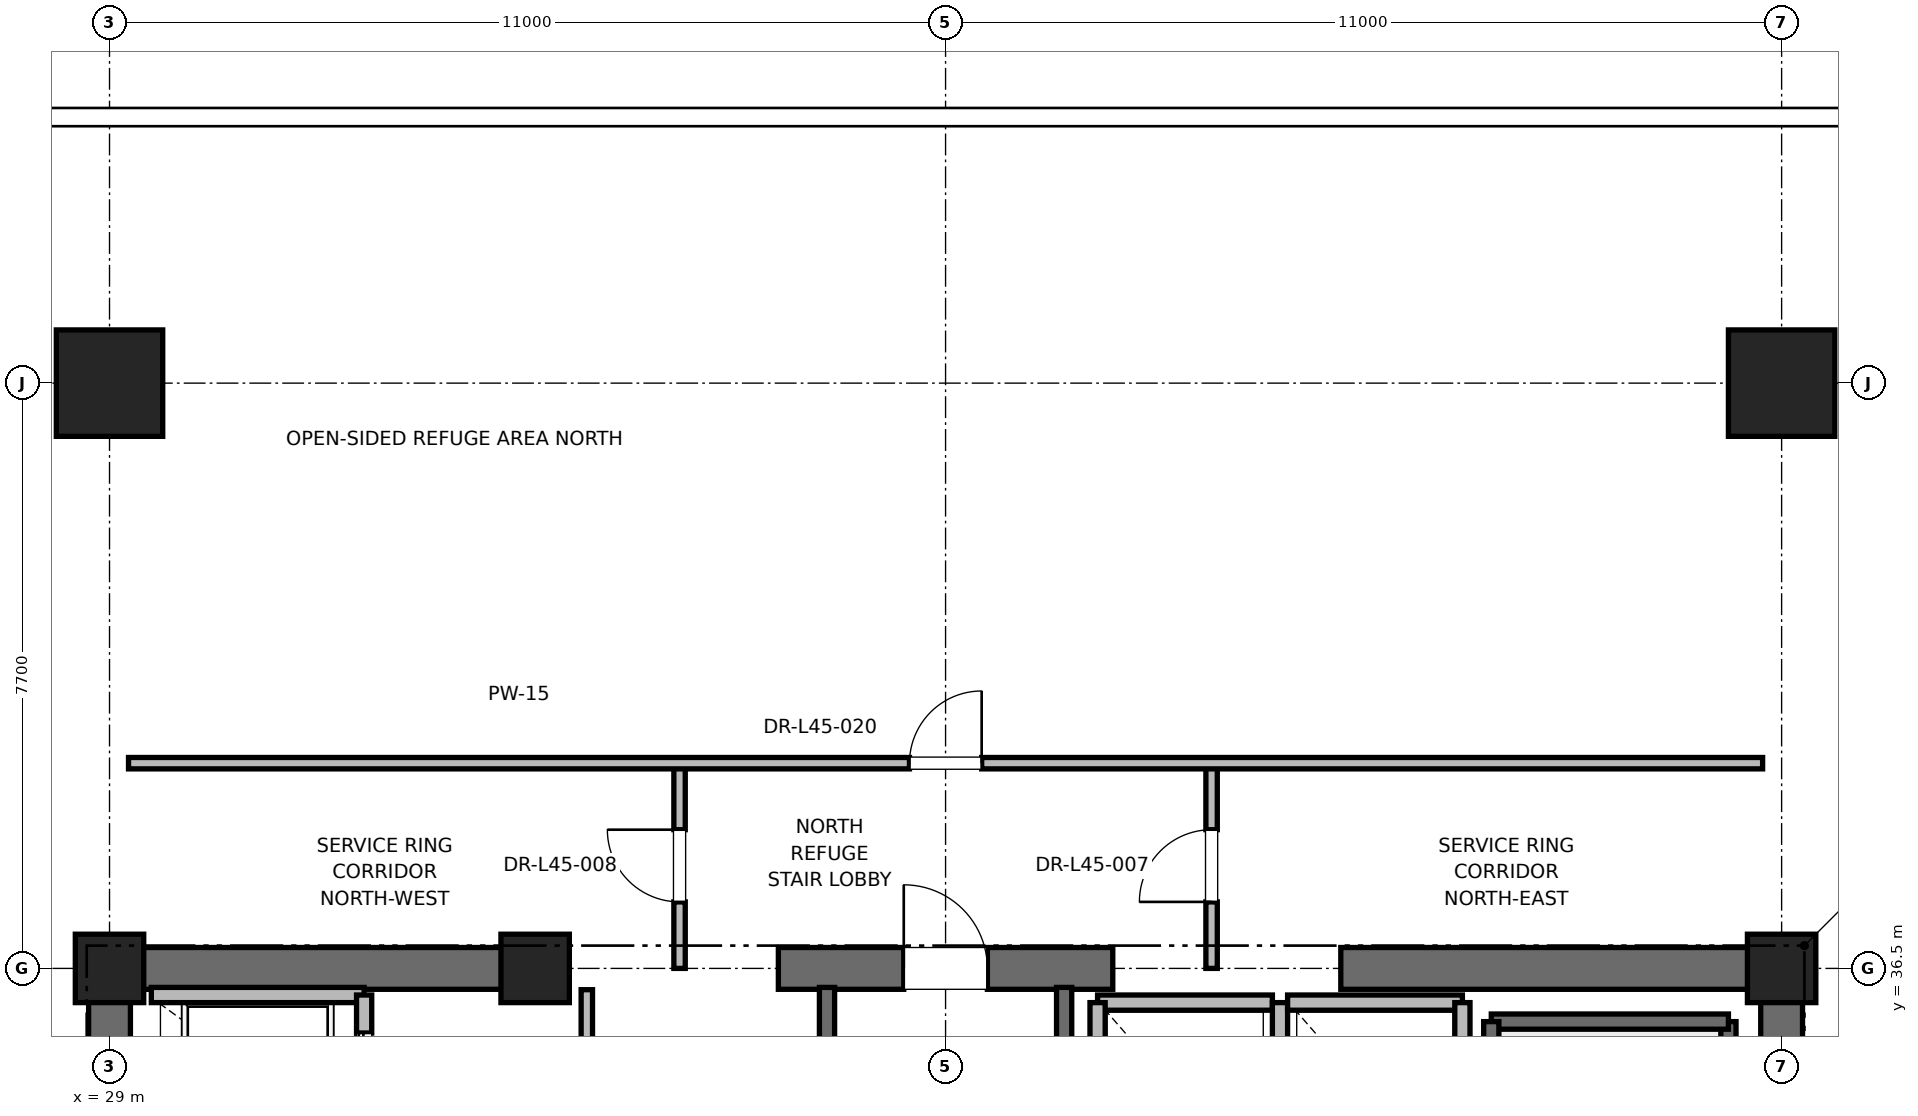
"""IFC4 building model, lengths in metres.
Left out: names, types, materials, properties, quantities, classifications, styles, units other than length and angle.
Written with IfcOpenShell. Run it as: python <this file> out.ifc"""

import sys

from ifc_helpers import new_model, si_unit, direction, frame, frame_2d, origin, origin_2d, place, context, subcontext, project, spatial, rectangle, extrude, element, fill, save


model = new_model("IFC4")
c1 = context("Model", 3, precision=1e-05, world=origin(), true_north=direction((0.0, 1.0)))
c2 = subcontext(c1, "Body", "Model", "MODEL_VIEW")
j1 = project(units=[si_unit("LENGTHUNIT", "METRE"), si_unit("PLANEANGLEUNIT", "RADIAN")], contexts=[c1])
p1 = place(None, origin())
s1 = spatial("IfcSite", under=j1, at=p1, CompositionType="ELEMENT")
p2 = place(p1, origin())
s2 = spatial("IfcBuilding", under=s1, at=p2, CompositionType="ELEMENT")
p3 = place(p2, frame((0.0, 0.0, 194.8)))
s3 = spatial("IfcBuildingStorey", under=s2, at=p3, CompositionType="ELEMENT", Elevation=194.8)
for number, where, z_axis, x_axis in (
    (1, (29.0, 44.2, 0.0), (0.0, 0.0, 1.0), (1.0, 0.0, 0.0)),
    (2, (51.0, 44.2, 0.0), (0.0, 0.0, 1.0), (1.0, 0.0, 0.0)),
):
    element("IfcColumn", number, at=place(p3, frame(where, z_axis=z_axis, x_axis=x_axis)), inside=s3, PredefinedType="COLUMN", context=c2, shape_type="SweptSolid", body=[
        extrude(rectangle(XDim=1.4, YDim=1.4, at=origin_2d()), origin(), (0.0, 0.0, 1.0), 5.4),
    ])
for number, where, z_axis, x_axis in (
    (3, (29.0, 36.5, 0.0), (0.0, 0.0, 1.0), (1.0, 0.0, 0.0)),
    (4, (51.0, 36.5, 0.0), (0.0, 0.0, 1.0), (1.0, 0.0, 0.0)),
    (5, (34.6, 36.5, 0.0), (0.0, 0.0, 1.0), (1.0, 0.0, 0.0)),
):
    element("IfcColumn", number, at=place(p3, frame(where, z_axis=z_axis, x_axis=x_axis)), inside=s3, PredefinedType="PILASTER", context=c2, shape_type="SweptSolid", body=[
        extrude(rectangle(XDim=0.9, YDim=0.9, at=origin_2d()), origin(), (0.0, 0.0, 1.0), 5.4),
    ])
p4 = place(p3, frame((29.0, 36.5, 0.0), z_axis=(0.0, 0.0, 1.0), x_axis=(1.0, 0.0, 0.0)))
e6 = element("IfcWall", 6, at=p4, inside=s3, PredefinedType="SHEAR", context=c2, shape_type="SweptSolid", body=[
    extrude(rectangle(XDim=5.8, YDim=0.55, at=frame_2d((2.9, 0.0))), origin(), (0.0, 0.0, 1.0), 5.1),
])
p5 = place(p3, frame((37.8, 36.5, 0.0), z_axis=(0.0, 0.0, 1.0), x_axis=(1.0, 0.0, 0.0)))
e7 = element("IfcWall", 7, at=p5, inside=s3, PredefinedType="SHEAR", context=c2, shape_type="SweptSolid", body=[
    extrude(rectangle(XDim=4.4, YDim=0.55, at=frame_2d((2.2, 0.0))), origin(), (0.0, 0.0, 1.0), 5.1),
])
p6 = place(p5, frame((1.65, 0.0, 0.0)))
e8 = element("IfcOpeningElement", 8, at=p6, cuts=e7, PredefinedType="OPENING", context=c2, shape_type="SweptSolid", body=[
    extrude(rectangle(XDim=1.1, YDim=2.15, at=frame_2d((0.55, 1.075))), frame((0.0, 0.275, 0.0), z_axis=(0.0, -1.0, 0.0), x_axis=(1.0, 0.0, 0.0)), (0.0, 0.0, 1.0), 0.55),
])
for number, where, z_axis, x_axis in (
    (9, (45.2, 36.5, 0.0), (0.0, 0.0, 1.0), (1.0, 0.0, 0.0)),
    (10, (29.0, 30.7, 0.0), (0.0, 0.0, 1.0), (0.0, 1.0, 0.0)),
):
    element("IfcWall", number, at=place(p3, frame(where, z_axis=z_axis, x_axis=x_axis)), inside=s3, PredefinedType="SHEAR", context=c2, shape_type="SweptSolid", body=[
        extrude(rectangle(XDim=5.8, YDim=0.55, at=frame_2d((2.9, 0.0))), origin(), (0.0, 0.0, 1.0), 5.1),
    ])
p7 = place(p3, frame((51.0, 27.7, 0.0), z_axis=(0.0, 0.0, 1.0), x_axis=(0.0, 1.0, 0.0)))
e11 = element("IfcWall", 11, at=p7, inside=s3, PredefinedType="SHEAR", context=c2, shape_type="SweptSolid", body=[
    extrude(rectangle(XDim=8.8, YDim=0.55, at=frame_2d((4.4, 0.0))), origin(), (0.0, 0.0, 1.0), 5.1),
])
p8 = place(p3, frame((50.3, 27.65, 0.0), z_axis=(0.0, 0.0, 1.0), x_axis=(0.0, 1.0, 0.0)))
e12 = element("IfcWall", 12, at=p8, inside=s3, PredefinedType="SOLIDWALL", context=c2, shape_type="SweptSolid", body=[
    extrude(rectangle(XDim=8.15, YDim=0.2, at=frame_2d((4.075, 0.0))), origin(), (0.0, 0.0, 1.0), 5.1),
])
p9 = place(p3, frame((47.18, 35.8, 0.0), z_axis=(0.0, 0.0, 1.0), x_axis=(1.0, 0.0, 0.0)))
e13 = element("IfcWall", 13, at=p9, inside=s3, PredefinedType="SOLIDWALL", context=c2, shape_type="SweptSolid", body=[
    extrude(rectangle(XDim=3.12, YDim=0.2, at=frame_2d((1.56, 0.0))), origin(), (0.0, 0.0, 1.0), 5.1),
])
p10 = place(p3, frame((47.18, 27.62, 0.0), z_axis=(0.0, 0.0, 1.0), x_axis=(0.0, 1.0, 0.0)))
e14 = element("IfcWall", 14, at=p10, inside=s3, PredefinedType="SOLIDWALL", context=c2, shape_type="SweptSolid", body=[
    extrude(rectangle(XDim=8.18, YDim=0.2, at=frame_2d((4.09, 0.0))), origin(), (0.0, 0.0, 1.0), 5.1),
])
p11 = place(p3, frame((38.44, 27.38, 0.0), z_axis=(0.0, 0.0, 1.0), x_axis=(0.0, 1.0, 0.0)))
e15 = element("IfcWall", 15, at=p11, inside=s3, PredefinedType="SOLIDWALL", context=c2, shape_type="SweptSolid", body=[
    extrude(rectangle(XDim=8.87, YDim=0.2, at=frame_2d((4.435, 0.0))), origin(), (0.0, 0.0, 1.0), 5.1),
])
p12 = place(p3, frame((41.56, 27.68, 0.0), z_axis=(0.0, 0.0, 1.0), x_axis=(0.0, 1.0, 0.0)))
e16 = element("IfcWall", 16, at=p12, inside=s3, PredefinedType="SOLIDWALL", context=c2, shape_type="SweptSolid", body=[
    extrude(rectangle(XDim=8.57, YDim=0.2, at=frame_2d((4.285, 0.0))), origin(), (0.0, 0.0, 1.0), 5.1),
])
p13 = place(p3, frame((32.35, 36.15, 0.0), z_axis=(0.0, 0.0, 1.0), x_axis=(-1.0, 0.0, 0.0)))
e17 = element("IfcWall", 17, at=p13, inside=s3, PredefinedType="SOLIDWALL", context=c2, shape_type="SweptSolid", body=[
    extrude(rectangle(XDim=2.8, YDim=0.2, at=frame_2d((1.4, 0.0))), origin(), (0.0, 0.0, 1.0), 4.153),
])
p14 = place(p3, frame((32.35, 34.05, 0.0), z_axis=(0.0, 0.0, 1.0), x_axis=(0.0, 1.0, 0.0)))
e18 = element("IfcWall", 18, at=p14, inside=s3, PredefinedType="SOLIDWALL", context=c2, shape_type="SweptSolid", body=[
    extrude(rectangle(XDim=2.1, YDim=0.2, at=frame_2d((1.05, 0.0))), origin(), (0.0, 0.0, 1.0), 5.1),
])
p15 = place(p14, frame((0.5, 0.0, 0.0)))
e19 = element("IfcOpeningElement", 19, at=p15, cuts=e18, PredefinedType="OPENING", context=c2, shape_type="SweptSolid", body=[
    extrude(rectangle(XDim=1.1, YDim=2.2, at=frame_2d((0.55, 1.1))), frame((0.0, 0.1, 0.0), z_axis=(0.0, -1.0, 0.0), x_axis=(1.0, 0.0, 0.0)), (0.0, 0.0, 1.0), 0.2),
])
p16 = place(p3, frame((44.3, 36.05, 0.0), z_axis=(0.0, 0.0, 1.0), x_axis=(-1.0, 0.0, 0.0)))
e20 = element("IfcWall", 20, at=p16, inside=s3, PredefinedType="SOLIDWALL", context=c2, shape_type="SweptSolid", body=[
    extrude(rectangle(XDim=2.3, YDim=0.2, at=frame_2d((1.15, 0.0))), origin(), (0.0, 0.0, 1.0), 4.08),
])
for number, where, z_axis, x_axis in (
    (21, (42.0, 36.05, 0.0), (0.0, 0.0, 1.0), (0.0, -1.0, 0.0)),
    (22, (44.4, 33.45, 0.0), (0.0, 0.0, 1.0), (0.0, 1.0, 0.0)),
):
    element("IfcWall", number, at=place(p3, frame(where, z_axis=z_axis, x_axis=x_axis)), inside=s3, PredefinedType="SOLIDWALL", context=c2, shape_type="SweptSolid", body=[
        extrude(rectangle(XDim=2.6, YDim=0.2, at=frame_2d((1.3, 0.0))), origin(), (0.0, 0.0, 1.0), 4.08),
    ])
p17 = place(p3, frame((46.8, 36.05, 0.0), z_axis=(0.0, 0.0, 1.0), x_axis=(-1.0, 0.0, 0.0)))
e23 = element("IfcWall", 23, at=p17, inside=s3, PredefinedType="SOLIDWALL", context=c2, shape_type="SweptSolid", body=[
    extrude(rectangle(XDim=2.3, YDim=0.2, at=frame_2d((1.15, 0.0))), origin(), (0.0, 0.0, 1.0), 4.08),
])
p18 = place(p3, frame((46.8, 33.45, 0.0), z_axis=(0.0, 0.0, 1.0), x_axis=(0.0, 1.0, 0.0)))
e24 = element("IfcWall", 24, at=p18, inside=s3, PredefinedType="SOLIDWALL", context=c2, shape_type="SweptSolid", body=[
    extrude(rectangle(XDim=2.6, YDim=0.2, at=frame_2d((1.3, 0.0))), origin(), (0.0, 0.0, 1.0), 5.1),
])
p19 = place(p3, frame((35.28, 33.95, 0.0), z_axis=(0.0, 0.0, 1.0), x_axis=(0.0, 1.0, 0.0)))
e25 = element("IfcWall", 25, at=p19, inside=s3, PredefinedType="PARTITIONING", context=c2, shape_type="SweptSolid", body=[
    extrude(rectangle(XDim=2.27, YDim=0.15, at=frame_2d((1.135, 0.0))), origin(), (0.0, 0.0, 1.0), 2.85),
])
p20 = place(p19, frame((0.66, 0.0, 0.0)))
e26 = element("IfcOpeningElement", 26, at=p20, cuts=e25, PredefinedType="OPENING", context=c2, shape_type="SweptSolid", body=[
    extrude(rectangle(XDim=0.95, YDim=2.15, at=frame_2d((0.475, 1.075))), frame((0.0, 0.075, 0.0), z_axis=(0.0, -1.0, 0.0), x_axis=(1.0, 0.0, 0.0)), (0.0, 0.0, 1.0), 0.15),
])
p21 = place(p3, frame((36.5, 36.5, 0.0), z_axis=(0.0, 0.0, 1.0), x_axis=(0.0, 1.0, 0.0)))
e27 = element("IfcWall", 27, at=p21, inside=s3, PredefinedType="PARTITIONING", context=c2, shape_type="SweptSolid", body=[
    extrude(rectangle(XDim=2.7, YDim=0.15, at=frame_2d((1.35, 0.0))), origin(), (0.0, 0.0, 1.0), 2.85),
])
p22 = place(p21, frame((0.875, 0.0, 0.0)))
e28 = element("IfcOpeningElement", 28, at=p22, cuts=e27, PredefinedType="OPENING", context=c2, shape_type="SweptSolid", body=[
    extrude(rectangle(XDim=0.95, YDim=2.15, at=frame_2d((0.475, 1.075))), frame((0.0, 0.075, 0.0), z_axis=(0.0, -1.0, 0.0), x_axis=(1.0, 0.0, 0.0)), (0.0, 0.0, 1.0), 0.15),
])
p23 = place(p3, frame((43.5, 36.5, 0.0), z_axis=(0.0, 0.0, 1.0), x_axis=(0.0, 1.0, 0.0)))
e29 = element("IfcWall", 29, at=p23, inside=s3, PredefinedType="PARTITIONING", context=c2, shape_type="SweptSolid", body=[
    extrude(rectangle(XDim=2.7, YDim=0.15, at=frame_2d((1.35, 0.0))), origin(), (0.0, 0.0, 1.0), 2.85),
])
p24 = place(p23, frame((0.875, 0.0, 0.0)))
e30 = element("IfcOpeningElement", 30, at=p24, cuts=e29, PredefinedType="OPENING", context=c2, shape_type="SweptSolid", body=[
    extrude(rectangle(XDim=0.95, YDim=2.15, at=frame_2d((0.475, 1.075))), frame((0.0, 0.075, 0.0), z_axis=(0.0, -1.0, 0.0), x_axis=(1.0, 0.0, 0.0)), (0.0, 0.0, 1.0), 0.15),
])
p25 = place(p3, frame((29.25, 39.2, 0.0), z_axis=(0.0, 0.0, 1.0), x_axis=(1.0, 0.0, 0.0)))
e31 = element("IfcWall", 31, at=p25, inside=s3, PredefinedType="PARTITIONING", context=c2, shape_type="SweptSolid", body=[
    extrude(rectangle(XDim=21.5, YDim=0.15, at=frame_2d((10.75, 0.0))), origin(), (0.0, 0.0, 1.0), 2.85),
])
p26 = place(p25, frame((10.275, 0.0, 0.0)))
e32 = element("IfcOpeningElement", 32, at=p26, cuts=e31, PredefinedType="OPENING", context=c2, shape_type="SweptSolid", body=[
    extrude(rectangle(XDim=0.95, YDim=2.15, at=frame_2d((0.475, 1.075))), frame((0.0, 0.075, 0.0), z_axis=(0.0, -1.0, 0.0), x_axis=(1.0, 0.0, 0.0)), (0.0, 0.0, 1.0), 0.15),
])
p27 = place(p6, origin())
e33 = element("IfcDoor", 33, at=p27, inside=s3, OperationType="SINGLE_SWING_LEFT", PredefinedType="DOOR", context=c2, shape_type="SweptSolid", body=[
    extrude(rectangle(XDim=1.1, YDim=2.15, at=frame_2d((0.55, 1.075))), frame((0.0, 0.025, 0.0), z_axis=(0.0, -1.0, 0.0), x_axis=(1.0, 0.0, 0.0)), (0.0, 0.0, 1.0), 0.05),
])
fill(e8, e33)
p28 = place(p15, origin())
e34 = element("IfcDoor", 34, at=p28, inside=s3, OperationType="SLIDING_TO_RIGHT", PredefinedType="DOOR", context=c2, shape_type="SweptSolid", body=[
    extrude(rectangle(XDim=1.1, YDim=2.2, at=frame_2d((0.55, 1.1))), frame((0.0, 0.025, 0.0), z_axis=(0.0, -1.0, 0.0), x_axis=(1.0, 0.0, 0.0)), (0.0, 0.0, 1.0), 0.05),
])
fill(e19, e34)
p29 = place(p22, origin())
e35 = element("IfcDoor", 35, at=p29, inside=s3, OperationType="SINGLE_SWING_RIGHT", PredefinedType="DOOR", context=c2, shape_type="SweptSolid", body=[
    extrude(rectangle(XDim=0.95, YDim=2.15, at=frame_2d((0.475, 1.075))), frame((0.0, 0.025, 0.0), z_axis=(0.0, -1.0, 0.0), x_axis=(1.0, 0.0, 0.0)), (0.0, 0.0, 1.0), 0.05),
])
fill(e28, e35)
p30 = place(p24, origin())
e36 = element("IfcDoor", 36, at=p30, inside=s3, OperationType="SINGLE_SWING_LEFT", PredefinedType="DOOR", context=c2, shape_type="SweptSolid", body=[
    extrude(rectangle(XDim=0.95, YDim=2.15, at=frame_2d((0.475, 1.075))), frame((0.0, 0.025, 0.0), z_axis=(0.0, -1.0, 0.0), x_axis=(1.0, 0.0, 0.0)), (0.0, 0.0, 1.0), 0.05),
])
fill(e30, e36)
p31 = place(p26, origin())
e37 = element("IfcDoor", 37, at=p31, inside=s3, OperationType="SINGLE_SWING_RIGHT", PredefinedType="DOOR", context=c2, shape_type="SweptSolid", body=[
    extrude(rectangle(XDim=0.95, YDim=2.15, at=frame_2d((0.475, 1.075))), frame((0.0, 0.025, 0.0), z_axis=(0.0, -1.0, 0.0), x_axis=(1.0, 0.0, 0.0)), (0.0, 0.0, 1.0), 0.05),
])
fill(e32, e37)
save(model, sys.argv[1])
